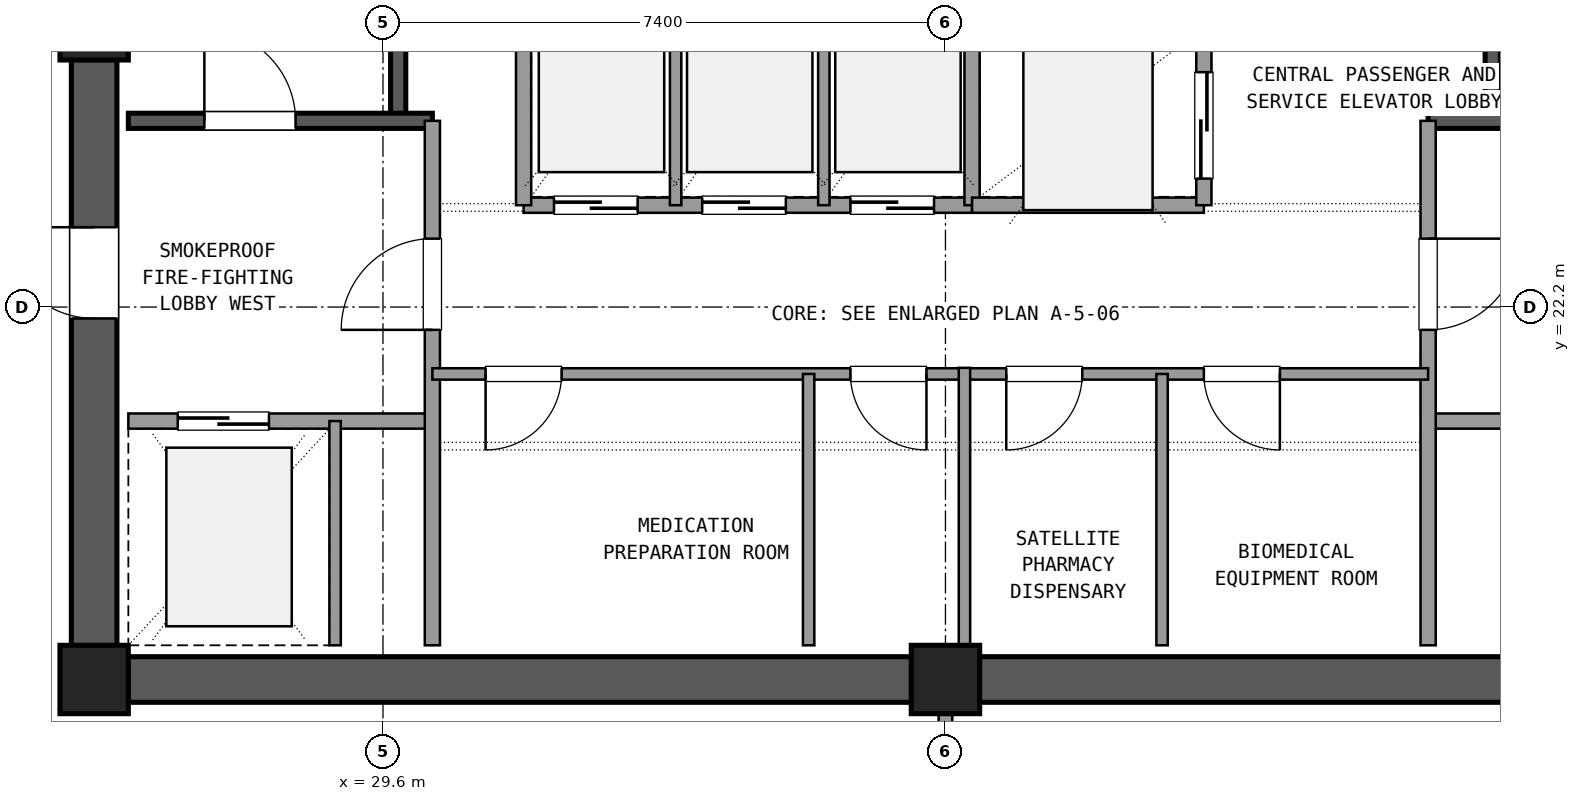
"""IFC4 building model, lengths in metres.
Left out: names, types, materials, properties, quantities, classifications, styles, units other than length and angle.
Written with IfcOpenShell. Run it as: python <this file> out.ifc"""

import sys

from ifc_helpers import new_model, si_unit, direction, frame, frame_2d, origin, origin_2d, place, context, subcontext, project, spatial, rectangle, extrude, element, fill, save


model = new_model("IFC4")
c1 = context("Model", 3, precision=1e-05, world=origin(), true_north=direction((0.0, 1.0)))
c2 = subcontext(c1, "Body", "Model", "MODEL_VIEW")
j1 = project(units=[si_unit("LENGTHUNIT", "METRE"), si_unit("PLANEANGLEUNIT", "RADIAN")], contexts=[c1])
p1 = place(None, origin())
s1 = spatial("IfcSite", under=j1, at=p1, CompositionType="ELEMENT")
p2 = place(p1, origin())
s2 = spatial("IfcBuilding", under=s1, at=p2, CompositionType="ELEMENT")
p3 = place(p2, frame((0.0, 0.0, 225.18)))
s3 = spatial("IfcBuildingStorey", under=s2, at=p3, CompositionType="ELEMENT", Elevation=225.18)
for number, where, z_axis, x_axis in (
    (1, (25.8, 17.3, 0.0), (0.0, 0.0, 1.0), (1.0, 0.0, 0.0)),
    (2, (37.0, 17.3, 0.0), (0.0, 0.0, 1.0), (1.0, 0.0, 0.0)),
    (3, (25.8, 25.9, 0.0), (0.0, 0.0, 1.0), (1.0, 0.0, 0.0)),
):
    element("IfcColumn", number, at=place(p3, frame(where, z_axis=z_axis, x_axis=x_axis)), inside=s3, PredefinedType="COLUMN", context=c2, shape_type="SweptSolid", body=[
        extrude(rectangle(XDim=0.9, YDim=0.9, at=origin_2d()), origin(), (0.0, 0.0, 1.0), 3.6),
    ])
for number, where, z_axis, x_axis in (
    (4, (26.245, 17.3, 0.0), (0.0, 0.0, 1.0), (1.0, 0.0, 0.0)),
    (5, (37.445, 17.3, 0.0), (0.0, 0.0, 1.0), (1.0, 0.0, 0.0)),
):
    element("IfcWall", number, at=place(p3, frame(where, z_axis=z_axis, x_axis=x_axis)), inside=s3, PredefinedType="SHEAR", context=c2, shape_type="SweptSolid", body=[
        extrude(rectangle(XDim=10.31, YDim=0.6, at=frame_2d((5.155, 0.0))), origin(), (0.0, 0.0, 1.0), 3.32),
    ])
p4 = place(p3, frame((25.8, 25.455, 0.0), z_axis=(0.0, 0.0, 1.0), x_axis=(0.0, -1.0, 0.0)))
e6 = element("IfcWall", 6, at=p4, inside=s3, PredefinedType="SHEAR", context=c2, shape_type="SweptSolid", body=[
    extrude(rectangle(XDim=7.71, YDim=0.6, at=frame_2d((3.855, 0.0))), origin(), (0.0, 0.0, 1.0), 3.32),
])
p5 = place(p4, frame((2.205, 0.0, 0.0)))
e7 = element("IfcOpeningElement", 7, at=p5, cuts=e6, PredefinedType="OPENING", context=c2, shape_type="SweptSolid", body=[
    extrude(rectangle(XDim=1.2, YDim=2.15, at=frame_2d((0.6, 1.075))), frame((0.0, 0.31, 0.0), z_axis=(0.0, -1.0, 0.0), x_axis=(1.0, 0.0, 0.0)), (0.0, 0.0, 1.0), 0.62),
])
p6 = place(p3, frame((29.8, 24.65, 0.0), z_axis=(0.0, 0.0, 1.0), x_axis=(0.0, 1.0, 0.0)))
e8 = element("IfcWall", 8, at=p6, inside=s3, PredefinedType="SHEAR", context=c2, shape_type="SweptSolid", body=[
    extrude(rectangle(XDim=9.4, YDim=0.2, at=frame_2d((4.7, 0.0))), origin(), (0.0, 0.0, 1.0), 3.32),
])
p7 = place(p3, frame((26.25, 24.65, 0.0), z_axis=(0.0, 0.0, 1.0), x_axis=(1.0, 0.0, 0.0)))
e9 = element("IfcWall", 9, at=p7, inside=s3, PredefinedType="SHEAR", context=c2, shape_type="SweptSolid", body=[
    extrude(rectangle(XDim=4.0, YDim=0.2, at=frame_2d((2.0, 0.0))), origin(), (0.0, 0.0, 1.0), 3.32),
])
p8 = place(p7, frame((1.0, 0.0, 0.0)))
e10 = element("IfcOpeningElement", 10, at=p8, cuts=e9, PredefinedType="OPENING", context=c2, shape_type="SweptSolid", body=[
    extrude(rectangle(XDim=1.2, YDim=2.15, at=frame_2d((0.6, 1.075))), frame((0.0, 0.11, 0.0), z_axis=(0.0, -1.0, 0.0), x_axis=(1.0, 0.0, 0.0)), (0.0, 0.0, 1.0), 0.22),
])
p9 = place(p3, frame((44.2, 24.65, 0.0), z_axis=(0.0, 0.0, 1.0), x_axis=(0.0, 1.0, 0.0)))
e11 = element("IfcWall", 11, at=p9, inside=s3, PredefinedType="SHEAR", context=c2, shape_type="SweptSolid", body=[
    extrude(rectangle(XDim=9.4, YDim=0.2, at=frame_2d((4.7, 0.0))), origin(), (0.0, 0.0, 1.0), 3.32),
])
p10 = place(p3, frame((43.35, 24.65, 0.0), z_axis=(0.0, 0.0, 1.0), x_axis=(1.0, 0.0, 0.0)))
e12 = element("IfcWall", 12, at=p10, inside=s3, PredefinedType="SHEAR", context=c2, shape_type="SweptSolid", body=[
    extrude(rectangle(XDim=4.4, YDim=0.2, at=frame_2d((2.2, 0.0))), origin(), (0.0, 0.0, 1.0), 3.32),
])
p11 = place(p10, frame((2.0, 0.0, 0.0)))
e13 = element("IfcOpeningElement", 13, at=p11, cuts=e12, PredefinedType="OPENING", context=c2, shape_type="SweptSolid", body=[
    extrude(rectangle(XDim=1.2, YDim=2.15, at=frame_2d((0.6, 1.075))), frame((0.0, 0.11, 0.0), z_axis=(0.0, -1.0, 0.0), x_axis=(1.0, 0.0, 0.0)), (0.0, 0.0, 1.0), 0.22),
])
p12 = place(p3, frame((26.25, 20.7, 0.0), z_axis=(0.0, 0.0, 1.0), x_axis=(1.0, 0.0, 0.0)))
e14 = element("IfcWall", 14, at=p12, inside=s3, PredefinedType="SOLIDWALL", context=c2, shape_type="SweptSolid", body=[
    extrude(rectangle(XDim=4.0, YDim=0.2, at=frame_2d((2.0, 0.0))), origin(), (0.0, 0.0, 1.0), 2.61),
])
p13 = place(p12, frame((0.65, 0.0, 0.0)))
e15 = element("IfcOpeningElement", 15, at=p13, cuts=e14, PredefinedType="OPENING", context=c2, shape_type="SweptSolid", body=[
    extrude(rectangle(XDim=1.2, YDim=2.15, at=frame_2d((0.6, 1.075))), frame((0.0, 0.11, 0.0), z_axis=(0.0, -1.0, 0.0), x_axis=(1.0, 0.0, 0.0)), (0.0, 0.0, 1.0), 0.22),
])
p14 = place(p3, frame((30.25, 17.75, 0.0), z_axis=(0.0, 0.0, 1.0), x_axis=(0.0, 1.0, 0.0)))
e16 = element("IfcWall", 16, at=p14, inside=s3, PredefinedType="SOLIDWALL", context=c2, shape_type="SweptSolid", body=[
    extrude(rectangle(XDim=6.9, YDim=0.2, at=frame_2d((3.45, 0.0))), origin(), (0.0, 0.0, 1.0), 2.61),
])
p15 = place(p14, frame((4.15, 0.0, 0.0)))
e17 = element("IfcOpeningElement", 17, at=p15, cuts=e16, PredefinedType="OPENING", context=c2, shape_type="SweptSolid", body=[
    extrude(rectangle(XDim=1.2, YDim=2.15, at=frame_2d((0.6, 1.075))), frame((0.0, 0.11, 0.0), z_axis=(0.0, -1.0, 0.0), x_axis=(1.0, 0.0, 0.0)), (0.0, 0.0, 1.0), 0.22),
])
p16 = place(p3, frame((28.97, 17.75, 0.0), z_axis=(0.0, 0.0, 1.0), x_axis=(0.0, 1.0, 0.0)))
e18 = element("IfcWall", 18, at=p16, inside=s3, PredefinedType="PARTITIONING", context=c2, shape_type="SweptSolid", body=[
    extrude(rectangle(XDim=2.95, YDim=0.15, at=frame_2d((1.475, 0.0))), origin(), (0.0, 0.0, 1.0), 2.61),
])
p17 = place(p3, frame((43.35, 20.7, 0.0), z_axis=(0.0, 0.0, 1.0), x_axis=(1.0, 0.0, 0.0)))
e19 = element("IfcWall", 19, at=p17, inside=s3, PredefinedType="SOLIDWALL", context=c2, shape_type="SweptSolid", body=[
    extrude(rectangle(XDim=4.4, YDim=0.2, at=frame_2d((2.2, 0.0))), origin(), (0.0, 0.0, 1.0), 2.61),
])
p18 = place(p17, frame((2.35, 0.0, 0.0)))
e20 = element("IfcOpeningElement", 20, at=p18, cuts=e19, PredefinedType="OPENING", context=c2, shape_type="SweptSolid", body=[
    extrude(rectangle(XDim=1.2, YDim=2.15, at=frame_2d((0.6, 1.075))), frame((0.0, 0.11, 0.0), z_axis=(0.0, -1.0, 0.0), x_axis=(1.0, 0.0, 0.0)), (0.0, 0.0, 1.0), 0.22),
])
p19 = place(p3, frame((43.35, 17.75, 0.0), z_axis=(0.0, 0.0, 1.0), x_axis=(0.0, 1.0, 0.0)))
e21 = element("IfcWall", 21, at=p19, inside=s3, PredefinedType="SOLIDWALL", context=c2, shape_type="SweptSolid", body=[
    extrude(rectangle(XDim=6.9, YDim=0.2, at=frame_2d((3.45, 0.0))), origin(), (0.0, 0.0, 1.0), 2.61),
])
p20 = place(p19, frame((4.15, 0.0, 0.0)))
e22 = element("IfcOpeningElement", 22, at=p20, cuts=e21, PredefinedType="OPENING", context=c2, shape_type="SweptSolid", body=[
    extrude(rectangle(XDim=1.2, YDim=2.15, at=frame_2d((0.6, 1.075))), frame((0.0, 0.11, 0.0), z_axis=(0.0, -1.0, 0.0), x_axis=(1.0, 0.0, 0.0)), (0.0, 0.0, 1.0), 0.22),
])
p21 = place(p3, frame((30.25, 21.32, 0.0), z_axis=(0.0, 0.0, 1.0), x_axis=(1.0, 0.0, 0.0)))
e23 = element("IfcWall", 23, at=p21, inside=s3, PredefinedType="PARTITIONING", context=c2, shape_type="SweptSolid", body=[
    extrude(rectangle(XDim=7.0, YDim=0.15, at=frame_2d((3.5, 0.0))), origin(), (0.0, 0.0, 1.0), 2.61),
])
p22 = place(p21, frame((0.7, 0.0, 0.0)))
e24 = element("IfcOpeningElement", 24, at=p22, cuts=e23, PredefinedType="OPENING", context=c2, shape_type="SweptSolid", body=[
    extrude(rectangle(XDim=1.0, YDim=2.15, at=frame_2d((0.5, 1.075))), frame((0.0, 0.085, 0.0), z_axis=(0.0, -1.0, 0.0), x_axis=(1.0, 0.0, 0.0)), (0.0, 0.0, 1.0), 0.17),
])
p23 = place(p21, frame((5.5, 0.0, 0.0)))
e25 = element("IfcOpeningElement", 25, at=p23, cuts=e23, PredefinedType="OPENING", context=c2, shape_type="SweptSolid", body=[
    extrude(rectangle(XDim=1.0, YDim=2.15, at=frame_2d((0.5, 1.075))), frame((0.0, 0.085, 0.0), z_axis=(0.0, -1.0, 0.0), x_axis=(1.0, 0.0, 0.0)), (0.0, 0.0, 1.0), 0.17),
])
p24 = place(p3, frame((35.2, 17.75, 0.0), z_axis=(0.0, 0.0, 1.0), x_axis=(0.0, 1.0, 0.0)))
e26 = element("IfcWall", 26, at=p24, inside=s3, PredefinedType="PARTITIONING", context=c2, shape_type="SweptSolid", body=[
    extrude(rectangle(XDim=3.57, YDim=0.15, at=frame_2d((1.785, 0.0))), origin(), (0.0, 0.0, 1.0), 2.61),
])
p25 = place(p3, frame((37.25, 21.32, 0.0), z_axis=(0.0, 0.0, 1.0), x_axis=(1.0, 0.0, 0.0)))
e27 = element("IfcWall", 27, at=p25, inside=s3, PredefinedType="PARTITIONING", context=c2, shape_type="SweptSolid", body=[
    extrude(rectangle(XDim=6.1, YDim=0.15, at=frame_2d((3.05, 0.0))), origin(), (0.0, 0.0, 1.0), 2.61),
])
p26 = place(p25, frame((0.55, 0.0, 0.0)))
e28 = element("IfcOpeningElement", 28, at=p26, cuts=e27, PredefinedType="OPENING", context=c2, shape_type="SweptSolid", body=[
    extrude(rectangle(XDim=1.0, YDim=2.15, at=frame_2d((0.5, 1.075))), frame((0.0, 0.085, 0.0), z_axis=(0.0, -1.0, 0.0), x_axis=(1.0, 0.0, 0.0)), (0.0, 0.0, 1.0), 0.17),
])
p27 = place(p25, frame((3.15, 0.0, 0.0)))
e29 = element("IfcOpeningElement", 29, at=p27, cuts=e27, PredefinedType="OPENING", context=c2, shape_type="SweptSolid", body=[
    extrude(rectangle(XDim=1.0, YDim=2.15, at=frame_2d((0.5, 1.075))), frame((0.0, 0.085, 0.0), z_axis=(0.0, -1.0, 0.0), x_axis=(1.0, 0.0, 0.0)), (0.0, 0.0, 1.0), 0.17),
])
p28 = place(p3, frame((39.85, 17.75, 0.0), z_axis=(0.0, 0.0, 1.0), x_axis=(0.0, 1.0, 0.0)))
e30 = element("IfcWall", 30, at=p28, inside=s3, PredefinedType="PARTITIONING", context=c2, shape_type="SweptSolid", body=[
    extrude(rectangle(XDim=3.57, YDim=0.15, at=frame_2d((1.785, 0.0))), origin(), (0.0, 0.0, 1.0), 2.61),
])
p29 = place(p3, frame((37.25, 17.75, 0.0), z_axis=(0.0, 0.0, 1.0), x_axis=(0.0, 1.0, 0.0)))
e31 = element("IfcWall", 31, at=p29, inside=s3, PredefinedType="PARTITIONING", context=c2, shape_type="SweptSolid", body=[
    extrude(rectangle(XDim=3.65, YDim=0.15, at=frame_2d((1.825, 0.0))), origin(), (0.0, 0.0, 1.0), 2.61),
])
p30 = place(p3, frame((31.45, 23.54, 0.0), z_axis=(0.0, 0.0, 1.0), x_axis=(1.0, 0.0, 0.0)))
e32 = element("IfcWall", 32, at=p30, inside=s3, PredefinedType="SOLIDWALL", context=c2, shape_type="SweptSolid", body=[
    extrude(rectangle(XDim=5.9, YDim=0.2, at=frame_2d((2.95, 0.0))), origin(), (0.0, 0.0, 1.0), 2.61),
])
p31 = place(p30, frame((0.4, 0.0, 0.0)))
e33 = element("IfcOpeningElement", 33, at=p31, cuts=e32, PredefinedType="OPENING", context=c2, shape_type="SweptSolid", body=[
    extrude(rectangle(XDim=1.1, YDim=2.15, at=frame_2d((0.55, 1.075))), frame((0.0, 0.11, 0.0), z_axis=(0.0, -1.0, 0.0), x_axis=(1.0, 0.0, 0.0)), (0.0, 0.0, 1.0), 0.22),
])
p32 = place(p30, frame((2.35, 0.0, 0.0)))
e34 = element("IfcOpeningElement", 34, at=p32, cuts=e32, PredefinedType="OPENING", context=c2, shape_type="SweptSolid", body=[
    extrude(rectangle(XDim=1.1, YDim=2.15, at=frame_2d((0.55, 1.075))), frame((0.0, 0.11, 0.0), z_axis=(0.0, -1.0, 0.0), x_axis=(1.0, 0.0, 0.0)), (0.0, 0.0, 1.0), 0.22),
])
p33 = place(p30, frame((4.3, 0.0, 0.0)))
e35 = element("IfcOpeningElement", 35, at=p33, cuts=e32, PredefinedType="OPENING", context=c2, shape_type="SweptSolid", body=[
    extrude(rectangle(XDim=1.1, YDim=2.15, at=frame_2d((0.55, 1.075))), frame((0.0, 0.11, 0.0), z_axis=(0.0, -1.0, 0.0), x_axis=(1.0, 0.0, 0.0)), (0.0, 0.0, 1.0), 0.22),
])
p34 = place(p3, frame((31.45, 23.54, 0.0), z_axis=(0.0, 0.0, 1.0), x_axis=(0.0, 1.0, 0.0)))
e36 = element("IfcWall", 36, at=p34, inside=s3, PredefinedType="SOLIDWALL", context=c2, shape_type="SweptSolid", body=[
    extrude(rectangle(XDim=2.81, YDim=0.2, at=frame_2d((1.405, 0.0))), origin(), (0.0, 0.0, 1.0), 2.61),
])
for number, where, z_axis, x_axis in (
    (37, (33.45, 23.54, 0.0), (0.0, 0.0, 1.0), (0.0, 1.0, 0.0)),
    (38, (35.4, 23.54, 0.0), (0.0, 0.0, 1.0), (0.0, 1.0, 0.0)),
):
    element("IfcWall", number, at=place(p3, frame(where, z_axis=z_axis, x_axis=x_axis)), inside=s3, PredefinedType="PARTITIONING", context=c2, shape_type="SweptSolid", body=[
        extrude(rectangle(XDim=2.81, YDim=0.15, at=frame_2d((1.405, 0.0))), origin(), (0.0, 0.0, 1.0), 2.61),
    ])
p35 = place(p3, frame((37.35, 23.54, 0.0), z_axis=(0.0, 0.0, 1.0), x_axis=(0.0, 1.0, 0.0)))
e39 = element("IfcWall", 39, at=p35, inside=s3, PredefinedType="SOLIDWALL", context=c2, shape_type="SweptSolid", body=[
    extrude(rectangle(XDim=6.82, YDim=0.2, at=frame_2d((3.41, 0.0))), origin(), (0.0, 0.0, 1.0), 2.61),
])
p36 = place(p3, frame((37.35, 23.54, 0.0), z_axis=(0.0, 0.0, 1.0), x_axis=(1.0, 0.0, 0.0)))
e40 = element("IfcWall", 40, at=p36, inside=s3, PredefinedType="SOLIDWALL", context=c2, shape_type="SweptSolid", body=[
    extrude(rectangle(XDim=3.05, YDim=0.2, at=frame_2d((1.525, 0.0))), origin(), (0.0, 0.0, 1.0), 2.61),
])
p37 = place(p3, frame((40.4, 23.54, 0.0), z_axis=(0.0, 0.0, 1.0), x_axis=(0.0, 1.0, 0.0)))
e41 = element("IfcWall", 41, at=p37, inside=s3, PredefinedType="SOLIDWALL", context=c2, shape_type="SweptSolid", body=[
    extrude(rectangle(XDim=6.82, YDim=0.2, at=frame_2d((3.41, 0.0))), origin(), (0.0, 0.0, 1.0), 2.61),
])
p38 = place(p37, frame((0.35, 0.0, 0.0)))
e42 = element("IfcOpeningElement", 42, at=p38, cuts=e41, PredefinedType="OPENING", context=c2, shape_type="SweptSolid", body=[
    extrude(rectangle(XDim=1.4, YDim=2.2, at=frame_2d((0.7, 1.1))), frame((0.0, 0.11, 0.0), z_axis=(0.0, -1.0, 0.0), x_axis=(1.0, 0.0, 0.0)), (0.0, 0.0, 1.0), 0.22),
])
p39 = place(p37, frame((2.65, 0.0, 0.0)))
e43 = element("IfcOpeningElement", 43, at=p39, cuts=e41, PredefinedType="OPENING", context=c2, shape_type="SweptSolid", body=[
    extrude(rectangle(XDim=1.4, YDim=2.2, at=frame_2d((0.7, 1.1))), frame((0.0, 0.11, 0.0), z_axis=(0.0, -1.0, 0.0), x_axis=(1.0, 0.0, 0.0)), (0.0, 0.0, 1.0), 0.22),
])
p40 = place(p37, frame((4.85, 0.0, 0.0)))
e44 = element("IfcOpeningElement", 44, at=p40, cuts=e41, PredefinedType="OPENING", context=c2, shape_type="SweptSolid", body=[
    extrude(rectangle(XDim=1.4, YDim=2.2, at=frame_2d((0.7, 1.1))), frame((0.0, 0.11, 0.0), z_axis=(0.0, -1.0, 0.0), x_axis=(1.0, 0.0, 0.0)), (0.0, 0.0, 1.0), 0.22),
])
p41 = place(p3, frame((37.0, 14.15, 0.0), z_axis=(0.0, 0.0, 1.0), x_axis=(0.0, 1.0, 0.0)))
e45 = element("IfcWall", 45, at=p41, inside=s3, PredefinedType="PARTITIONING", context=c2, shape_type="SweptSolid", body=[
    extrude(rectangle(XDim=2.7, YDim=0.18, at=frame_2d((1.35, 0.0))), origin(), (0.0, 0.0, 1.0), 2.61),
])
p42 = place(p41, frame((0.35, 0.0, 0.0)))
e46 = element("IfcOpeningElement", 46, at=p42, cuts=e45, PredefinedType="OPENING", context=c2, shape_type="SweptSolid", body=[
    extrude(rectangle(XDim=2.0, YDim=2.2, at=frame_2d((1.0, 1.1))), frame((0.0, 0.1, 0.0), z_axis=(0.0, -1.0, 0.0), x_axis=(1.0, 0.0, 0.0)), (0.0, 0.0, 1.0), 0.2),
])
p43 = place(p8, origin())
e47 = element("IfcDoor", 47, at=p43, inside=s3, OperationType="SINGLE_SWING_LEFT", PredefinedType="DOOR", context=c2, shape_type="SweptSolid", body=[
    extrude(rectangle(XDim=1.2, YDim=2.15, at=frame_2d((0.6, 1.075))), frame((0.0, 0.025, 0.0), z_axis=(0.0, -1.0, 0.0), x_axis=(1.0, 0.0, 0.0)), (0.0, 0.0, 1.0), 0.05),
])
fill(e10, e47)
p44 = place(p13, origin())
e48 = element("IfcDoor", 48, at=p44, inside=s3, OperationType="SLIDING_TO_LEFT", PredefinedType="DOOR", context=c2, shape_type="SweptSolid", body=[
    extrude(rectangle(XDim=1.2, YDim=2.15, at=frame_2d((0.6, 1.075))), frame((0.0, 0.025, 0.0), z_axis=(0.0, -1.0, 0.0), x_axis=(1.0, 0.0, 0.0)), (0.0, 0.0, 1.0), 0.05),
])
fill(e15, e48)
p45 = place(p15, origin())
e49 = element("IfcDoor", 49, at=p45, inside=s3, OperationType="SINGLE_SWING_LEFT", PredefinedType="DOOR", context=c2, shape_type="SweptSolid", body=[
    extrude(rectangle(XDim=1.2, YDim=2.15, at=frame_2d((0.6, 1.075))), frame((0.0, 0.025, 0.0), z_axis=(0.0, -1.0, 0.0), x_axis=(1.0, 0.0, 0.0)), (0.0, 0.0, 1.0), 0.05),
])
fill(e17, e49)
p46 = place(p20, frame((1.2, 0.0, 0.0), z_axis=(0.0, 0.0, 1.0), x_axis=(-1.0, 0.0, 0.0)))
e50 = element("IfcDoor", 50, at=p46, inside=s3, OperationType="SINGLE_SWING_RIGHT", PredefinedType="DOOR", context=c2, shape_type="SweptSolid", body=[
    extrude(rectangle(XDim=1.2, YDim=2.15, at=frame_2d((0.6, 1.075))), frame((0.0, 0.025, 0.0), z_axis=(0.0, -1.0, 0.0), x_axis=(1.0, 0.0, 0.0)), (0.0, 0.0, 1.0), 0.05),
])
fill(e22, e50)
p47 = place(p5, frame((1.2, 0.0, 0.0), z_axis=(0.0, 0.0, 1.0), x_axis=(-1.0, 0.0, 0.0)))
e51 = element("IfcDoor", 51, at=p47, inside=s3, OperationType="SINGLE_SWING_LEFT", PredefinedType="DOOR", context=c2, shape_type="SweptSolid", body=[
    extrude(rectangle(XDim=1.2, YDim=2.15, at=frame_2d((0.6, 1.075))), frame((0.0, 0.025, 0.0), z_axis=(0.0, -1.0, 0.0), x_axis=(1.0, 0.0, 0.0)), (0.0, 0.0, 1.0), 0.05),
])
fill(e7, e51)
p48 = place(p22, frame((1.0, 0.0, 0.0), z_axis=(0.0, 0.0, 1.0), x_axis=(-1.0, 0.0, 0.0)))
e52 = element("IfcDoor", 52, at=p48, inside=s3, OperationType="SINGLE_SWING_LEFT", PredefinedType="DOOR", context=c2, shape_type="SweptSolid", body=[
    extrude(rectangle(XDim=1.0, YDim=2.15, at=frame_2d((0.5, 1.075))), frame((0.0, 0.025, 0.0), z_axis=(0.0, -1.0, 0.0), x_axis=(1.0, 0.0, 0.0)), (0.0, 0.0, 1.0), 0.05),
])
fill(e24, e52)
p49 = place(p23, frame((1.0, 0.0, 0.0), z_axis=(0.0, 0.0, 1.0), x_axis=(-1.0, 0.0, 0.0)))
e53 = element("IfcDoor", 53, at=p49, inside=s3, OperationType="SINGLE_SWING_RIGHT", PredefinedType="DOOR", context=c2, shape_type="SweptSolid", body=[
    extrude(rectangle(XDim=1.0, YDim=2.15, at=frame_2d((0.5, 1.075))), frame((0.0, 0.025, 0.0), z_axis=(0.0, -1.0, 0.0), x_axis=(1.0, 0.0, 0.0)), (0.0, 0.0, 1.0), 0.05),
])
fill(e25, e53)
p50 = place(p26, frame((1.0, 0.0, 0.0), z_axis=(0.0, 0.0, 1.0), x_axis=(-1.0, 0.0, 0.0)))
e54 = element("IfcDoor", 54, at=p50, inside=s3, OperationType="SINGLE_SWING_LEFT", PredefinedType="DOOR", context=c2, shape_type="SweptSolid", body=[
    extrude(rectangle(XDim=1.0, YDim=2.15, at=frame_2d((0.5, 1.075))), frame((0.0, 0.025, 0.0), z_axis=(0.0, -1.0, 0.0), x_axis=(1.0, 0.0, 0.0)), (0.0, 0.0, 1.0), 0.05),
])
fill(e28, e54)
p51 = place(p27, frame((1.0, 0.0, 0.0), z_axis=(0.0, 0.0, 1.0), x_axis=(-1.0, 0.0, 0.0)))
e55 = element("IfcDoor", 55, at=p51, inside=s3, OperationType="SINGLE_SWING_RIGHT", PredefinedType="DOOR", context=c2, shape_type="SweptSolid", body=[
    extrude(rectangle(XDim=1.0, YDim=2.15, at=frame_2d((0.5, 1.075))), frame((0.0, 0.025, 0.0), z_axis=(0.0, -1.0, 0.0), x_axis=(1.0, 0.0, 0.0)), (0.0, 0.0, 1.0), 0.05),
])
fill(e29, e55)
p52 = place(p31, origin())
e56 = element("IfcDoor", 56, at=p52, inside=s3, OperationType="SLIDING_TO_RIGHT", PredefinedType="DOOR", context=c2, shape_type="SweptSolid", body=[
    extrude(rectangle(XDim=1.1, YDim=2.15, at=frame_2d((0.55, 1.075))), frame((0.0, 0.025, 0.0), z_axis=(0.0, -1.0, 0.0), x_axis=(1.0, 0.0, 0.0)), (0.0, 0.0, 1.0), 0.05),
])
fill(e33, e56)
p53 = place(p32, origin())
e57 = element("IfcDoor", 57, at=p53, inside=s3, OperationType="SLIDING_TO_RIGHT", PredefinedType="DOOR", context=c2, shape_type="SweptSolid", body=[
    extrude(rectangle(XDim=1.1, YDim=2.15, at=frame_2d((0.55, 1.075))), frame((0.0, 0.025, 0.0), z_axis=(0.0, -1.0, 0.0), x_axis=(1.0, 0.0, 0.0)), (0.0, 0.0, 1.0), 0.05),
])
fill(e34, e57)
p54 = place(p33, origin())
e58 = element("IfcDoor", 58, at=p54, inside=s3, OperationType="SLIDING_TO_RIGHT", PredefinedType="DOOR", context=c2, shape_type="SweptSolid", body=[
    extrude(rectangle(XDim=1.1, YDim=2.15, at=frame_2d((0.55, 1.075))), frame((0.0, 0.025, 0.0), z_axis=(0.0, -1.0, 0.0), x_axis=(1.0, 0.0, 0.0)), (0.0, 0.0, 1.0), 0.05),
])
fill(e35, e58)
p55 = place(p38, origin())
e59 = element("IfcDoor", 59, at=p55, inside=s3, OperationType="SLIDING_TO_LEFT", PredefinedType="DOOR", context=c2, shape_type="SweptSolid", body=[
    extrude(rectangle(XDim=1.4, YDim=2.2, at=frame_2d((0.7, 1.1))), frame((0.0, 0.025, 0.0), z_axis=(0.0, -1.0, 0.0), x_axis=(1.0, 0.0, 0.0)), (0.0, 0.0, 1.0), 0.05),
])
fill(e42, e59)
save(model, sys.argv[1])
